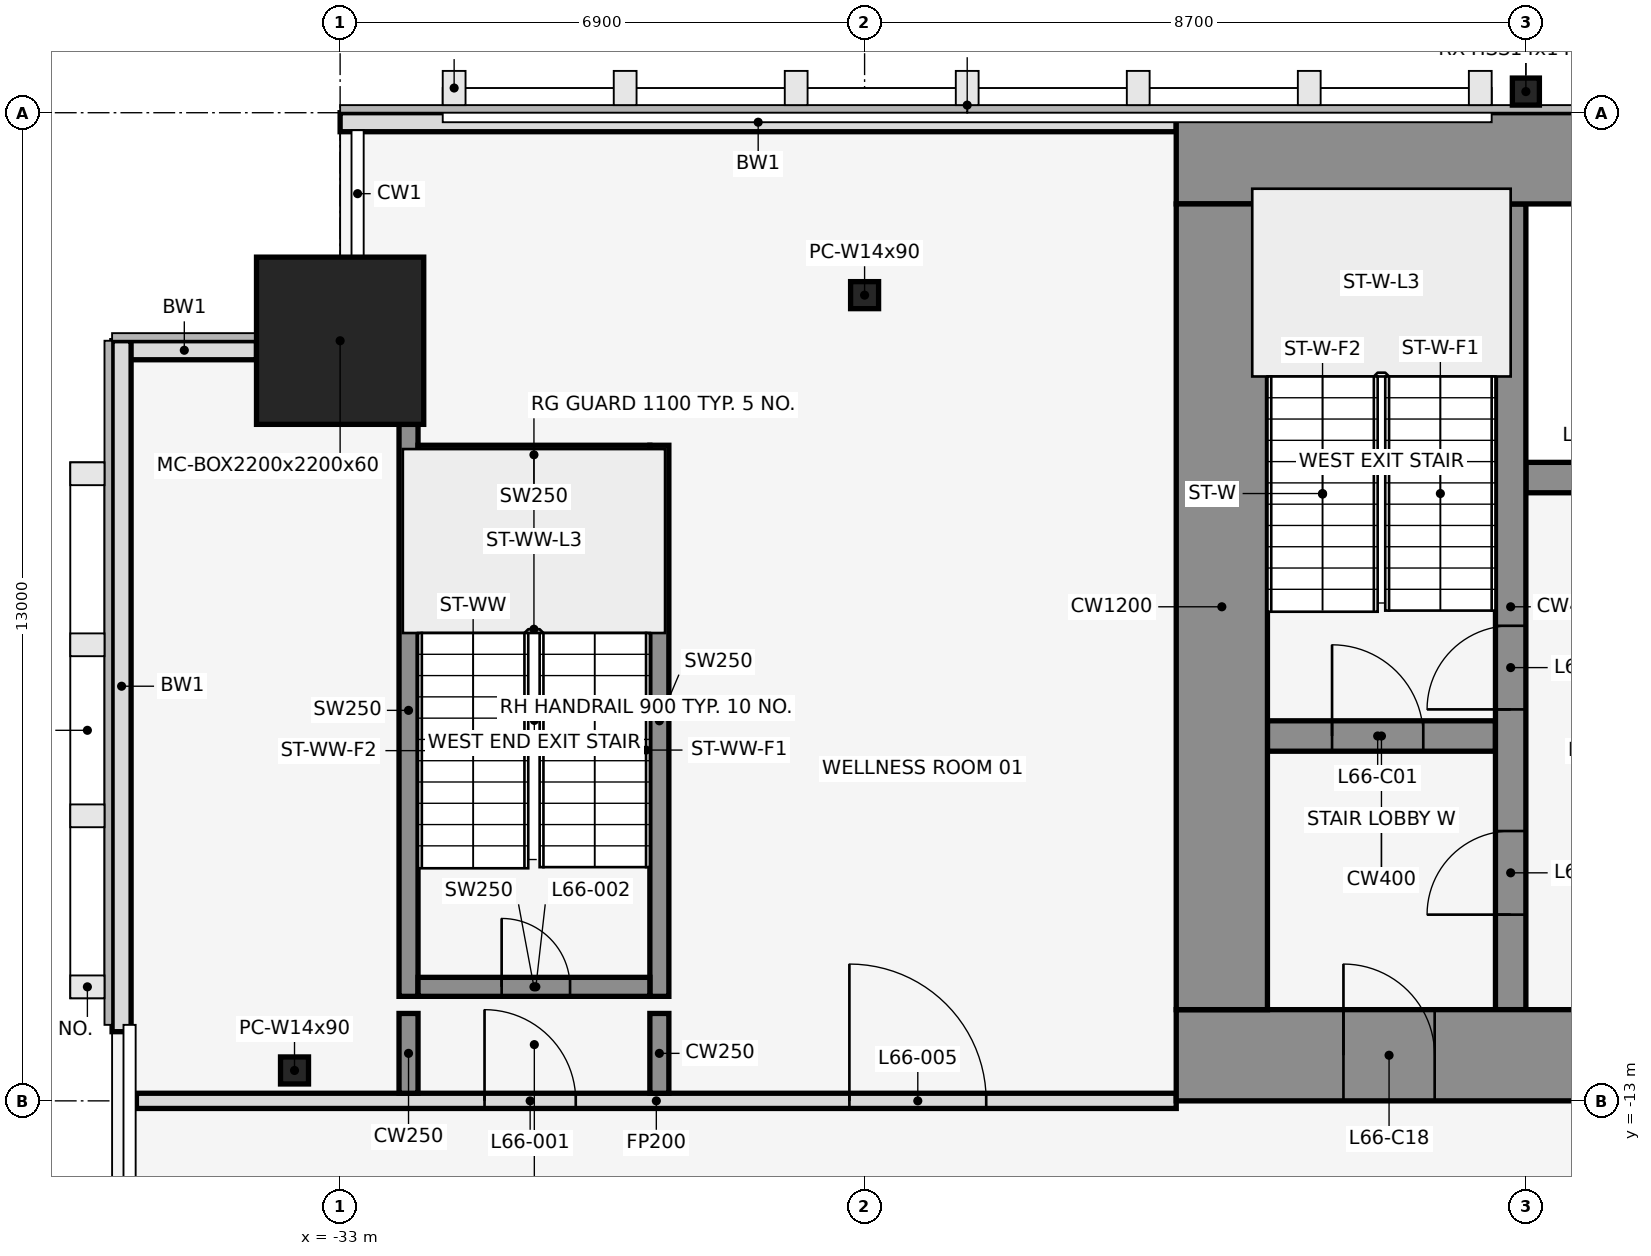
"""IFC4 building model, lengths in metres.
Left out: names, types, materials, properties, quantities, classifications, styles, units other than length and angle.
Written with IfcOpenShell. Run it as: python <this file> out.ifc"""

import sys

from ifc_helpers import new_model, si_unit, direction, frame, frame_2d, origin, origin_2d, place, context, subcontext, project, spatial, rectangle, hollow_rectangle, i_section, extrude, element, fill, save


model = new_model("IFC4")
c1 = context("Model", 3, precision=1e-05, world=origin(), true_north=direction((0.0, 1.0)))
c2 = subcontext(c1, "Body", "Model", "MODEL_VIEW")
j1 = project(units=[si_unit("LENGTHUNIT", "METRE"), si_unit("PLANEANGLEUNIT", "RADIAN")], contexts=[c1])
p1 = place(None, origin())
s1 = spatial("IfcSite", under=j1, at=p1, CompositionType="ELEMENT")
p2 = place(p1, origin())
s2 = spatial("IfcBuilding", under=s1, at=p2, CompositionType="ELEMENT")
p3 = place(p2, frame((0.0, 0.0, 293.0)))
s3 = spatial("IfcBuildingStorey", under=s2, at=p3, CompositionType="ELEMENT", Elevation=293.0)
p4 = place(p3, frame((-33.0, -3.0, 0.0), z_axis=(0.0, 0.0, 1.0), x_axis=(1.0, 0.0, 0.0)))
e1 = element("IfcColumn", 1, at=p4, inside=s3, PredefinedType="COLUMN", context=c2, shape_type="SweptSolid", body=[
    extrude(hollow_rectangle(XDim=2.2, YDim=2.2, WallThickness=0.06, at=origin_2d()), origin(), (0.0, 0.0, 1.0), 4.5),
])
p5 = place(p3, frame((-26.1, -2.4, 0.0), z_axis=(0.0, 0.0, 1.0), x_axis=(1.0, 0.0, 0.0)))
e2 = element("IfcColumn", 2, at=p5, inside=s3, PredefinedType="COLUMN", context=c2, shape_type="SweptSolid", body=[
    extrude(i_section(OverallWidth=0.368, OverallDepth=0.356, WebThickness=0.011, FlangeThickness=0.018, at=origin_2d()), origin(), (0.0, 0.0, 1.0), 4.5),
])
p6 = place(p3, frame((-17.4, 0.278, 0.0), z_axis=(0.0, 0.0, 1.0), x_axis=(1.0, 0.0, 0.0)))
e3 = element("IfcColumn", 3, at=p6, inside=s3, PredefinedType="COLUMN", context=c2, shape_type="SweptSolid", body=[
    extrude(hollow_rectangle(XDim=0.356, YDim=0.356, WallThickness=0.012, at=origin_2d()), origin(), (0.0, 0.0, 1.0), 4.5),
])
p7 = place(p3, frame((-33.6, -12.6, 0.0), z_axis=(0.0, 0.0, 1.0), x_axis=(1.0, 0.0, 0.0)))
e4 = element("IfcColumn", 4, at=p7, inside=s3, PredefinedType="COLUMN", context=c2, shape_type="SweptSolid", body=[
    extrude(i_section(OverallWidth=0.368, OverallDepth=0.356, WebThickness=0.011, FlangeThickness=0.018, at=origin_2d()), origin(), (0.0, 0.0, 1.0), 4.5),
])
p8 = place(p3, frame((-22.0, -0.125, 0.0), z_axis=(0.0, 0.0, 1.0), x_axis=(-1.0, 0.0, 0.0)))
e5 = element("IfcWall", 5, at=p8, inside=s3, PredefinedType="STANDARD", context=c2, shape_type="SweptSolid", body=[
    extrude(rectangle(XDim=11.0, YDim=0.25, at=frame_2d((5.5, 0.0))), origin(), (0.0, 0.0, 1.0), 4.35),
])
p9 = place(p3, frame((-34.1, -3.125, 0.0), z_axis=(0.0, 0.0, 1.0), x_axis=(-1.0, 0.0, 0.0)))
e6 = element("IfcWall", 6, at=p9, inside=s3, PredefinedType="STANDARD", context=c2, shape_type="SweptSolid", body=[
    extrude(rectangle(XDim=1.9, YDim=0.25, at=frame_2d((0.95, 0.0))), origin(), (0.0, 0.0, 1.0), 4.35),
])
p10 = place(p3, frame((-35.875, -3.0, 0.0), z_axis=(0.0, 0.0, 1.0), x_axis=(0.0, -1.0, 0.0)))
e7 = element("IfcWall", 7, at=p10, inside=s3, PredefinedType="STANDARD", context=c2, shape_type="SweptSolid", body=[
    extrude(rectangle(XDim=9.09, YDim=0.25, at=frame_2d((4.545, 0.0))), origin(), (0.0, 0.0, 1.0), 4.35),
])
p11 = place(p3, frame((-32.1, -11.625, 0.0), z_axis=(0.0, 0.0, 1.0), x_axis=(0.0, 1.0, 0.0)))
e8 = element("IfcWall", 8, at=p11, inside=s3, PredefinedType="SHEAR", context=c2, shape_type="SweptSolid", body=[
    extrude(rectangle(XDim=7.525, YDim=0.25, at=frame_2d((3.762, 0.0))), origin(), (0.0, 0.0, 1.0), 4.5),
])
p12 = place(p3, frame((-28.8, -11.625, 0.0), z_axis=(0.0, 0.0, 1.0), x_axis=(0.0, 1.0, 0.0)))
e9 = element("IfcWall", 9, at=p12, inside=s3, PredefinedType="SHEAR", context=c2, shape_type="SweptSolid", body=[
    extrude(rectangle(XDim=7.25, YDim=0.25, at=frame_2d((3.625, 0.0))), origin(), (0.0, 0.0, 1.0), 4.5),
])
p13 = place(p3, frame((-31.975, -11.5, 0.0), z_axis=(0.0, 0.0, 1.0), x_axis=(1.0, 0.0, 0.0)))
e10 = element("IfcWall", 10, at=p13, inside=s3, PredefinedType="SHEAR", context=c2, shape_type="SweptSolid", body=[
    extrude(rectangle(XDim=3.05, YDim=0.25, at=frame_2d((1.525, 0.0))), origin(), (0.0, 0.0, 1.0), 4.5),
])
p14 = place(p13, frame((1.1, 0.0, 0.0)))
e11 = element("IfcOpeningElement", 11, at=p14, cuts=e10, PredefinedType="OPENING", context=c2, shape_type="SweptSolid", body=[
    extrude(rectangle(XDim=0.9, YDim=2.1, at=frame_2d((0.45, 1.05))), frame((0.0, 0.137, 0.0), z_axis=(0.0, -1.0, 0.0), x_axis=(1.0, 0.0, 0.0)), (0.0, 0.0, 1.0), 0.274),
])
p15 = place(p3, frame((-31.975, -4.5, 0.0), z_axis=(0.0, 0.0, 1.0), x_axis=(1.0, 0.0, 0.0)))
e12 = element("IfcWall", 12, at=p15, inside=s3, PredefinedType="SHEAR", context=c2, shape_type="SweptSolid", body=[
    extrude(rectangle(XDim=3.05, YDim=0.25, at=frame_2d((1.525, 0.0))), origin(), (0.0, 0.0, 1.0), 4.5),
])
p16 = place(p3, frame((-35.68, -13.0, 0.0), z_axis=(0.0, 0.0, 1.0), x_axis=(1.0, 0.0, 0.0)))
e13 = element("IfcWall", 13, at=p16, inside=s3, PredefinedType="PARTITIONING", context=c2, shape_type="SweptSolid", body=[
    extrude(rectangle(XDim=13.68, YDim=0.2, at=frame_2d((6.84, 0.0))), origin(), (0.0, 0.0, 1.0), 3.418),
])
p17 = place(p16, frame((4.58, 0.0, 0.0)))
e14 = element("IfcOpeningElement", 14, at=p17, cuts=e13, PredefinedType="OPENING", context=c2, shape_type="SweptSolid", body=[
    extrude(rectangle(XDim=1.2, YDim=2.1, at=frame_2d((0.6, 1.05))), frame((0.0, 0.112, 0.0), z_axis=(0.0, -1.0, 0.0), x_axis=(1.0, 0.0, 0.0)), (0.0, 0.0, 1.0), 0.224),
])
p18 = place(p16, frame((9.38, 0.0, 0.0)))
e15 = element("IfcOpeningElement", 15, at=p18, cuts=e13, PredefinedType="OPENING", context=c2, shape_type="SweptSolid", body=[
    extrude(rectangle(XDim=1.8, YDim=2.1, at=frame_2d((0.9, 1.05))), frame((0.0, 0.112, 0.0), z_axis=(0.0, -1.0, 0.0), x_axis=(1.0, 0.0, 0.0)), (0.0, 0.0, 1.0), 0.224),
])
for number, where, z_axis, x_axis in (
    (16, (-32.1, -12.9, 0.0), (0.0, 0.0, 1.0), (0.0, 1.0, 0.0)),
    (17, (-28.8, -12.9, 0.0), (0.0, 0.0, 1.0), (0.0, 1.0, 0.0)),
):
    element("IfcWall", number, at=place(p3, frame(where, z_axis=z_axis, x_axis=x_axis)), inside=s3, PredefinedType="SHEAR", context=c2, shape_type="SweptSolid", body=[
        extrude(rectangle(XDim=1.05, YDim=0.25, at=frame_2d((0.525, 0.0))), origin(), (0.0, 0.0, 1.0), 4.5),
    ])
p19 = place(p3, frame((-20.8, -8.2, 0.0), z_axis=(0.0, 0.0, 1.0), x_axis=(1.0, 0.0, 0.0)))
e18 = element("IfcWall", 18, at=p19, inside=s3, PredefinedType="SHEAR", context=c2, shape_type="SweptSolid", body=[
    extrude(rectangle(XDim=3.0, YDim=0.4, at=frame_2d((1.5, 0.0))), origin(), (0.0, 0.0, 1.0), 4.5),
])
p20 = place(p19, frame((0.85, 0.0, 0.0)))
e19 = element("IfcOpeningElement", 19, at=p20, cuts=e18, PredefinedType="OPENING", context=c2, shape_type="SweptSolid", body=[
    extrude(rectangle(XDim=1.2, YDim=2.1, at=frame_2d((0.6, 1.05))), frame((0.0, 0.212, 0.0), z_axis=(0.0, -1.0, 0.0), x_axis=(1.0, 0.0, 0.0)), (0.0, 0.0, 1.0), 0.424),
])
p21 = place(p3, frame((-17.4, -4.8, 0.0), z_axis=(0.0, 0.0, 1.0), x_axis=(1.0, 0.0, 0.0)))
e20 = element("IfcWall", 20, at=p21, inside=s3, PredefinedType="SHEAR", context=c2, shape_type="SweptSolid", body=[
    extrude(rectangle(XDim=13.6, YDim=0.4, at=frame_2d((6.8, 0.0))), origin(), (0.0, 0.0, 1.0), 4.5),
])
p22 = place(p21, frame((0.65, 0.0, 0.0)))
e21 = element("IfcOpeningElement", 21, at=p22, cuts=e20, PredefinedType="OPENING", context=c2, shape_type="SweptSolid", body=[
    extrude(rectangle(XDim=1.1, YDim=2.1, at=frame_2d((0.55, 1.05))), frame((0.0, 0.212, 0.0), z_axis=(0.0, -1.0, 0.0), x_axis=(1.0, 0.0, 0.0)), (0.0, 0.0, 1.0), 0.424),
])
p23 = place(p21, frame((2.95, 0.0, 0.0)))
e22 = element("IfcOpeningElement", 22, at=p23, cuts=e20, PredefinedType="OPENING", context=c2, shape_type="SweptSolid", body=[
    extrude(rectangle(XDim=1.1, YDim=2.1, at=frame_2d((0.55, 1.05))), frame((0.0, 0.212, 0.0), z_axis=(0.0, -1.0, 0.0), x_axis=(1.0, 0.0, 0.0)), (0.0, 0.0, 1.0), 0.424),
])
p24 = place(p21, frame((5.85, 0.0, 0.0)))
e23 = element("IfcOpeningElement", 23, at=p24, cuts=e20, PredefinedType="OPENING", context=c2, shape_type="SweptSolid", body=[
    extrude(rectangle(XDim=0.9, YDim=2.1, at=frame_2d((0.45, 1.05))), frame((0.0, 0.212, 0.0), z_axis=(0.0, -1.0, 0.0), x_axis=(1.0, 0.0, 0.0)), (0.0, 0.0, 1.0), 0.424),
])
p25 = place(p21, frame((10.25, 0.0, 0.0)))
e24 = element("IfcOpeningElement", 24, at=p25, cuts=e20, PredefinedType="OPENING", context=c2, shape_type="SweptSolid", body=[
    extrude(rectangle(XDim=0.9, YDim=2.1, at=frame_2d((0.45, 1.05))), frame((0.0, 0.212, 0.0), z_axis=(0.0, -1.0, 0.0), x_axis=(1.0, 0.0, 0.0)), (0.0, 0.0, 1.0), 0.424),
])
p26 = place(p3, frame((-17.6, -11.8, 0.0), z_axis=(0.0, 0.0, 1.0), x_axis=(0.0, 1.0, 0.0)))
e25 = element("IfcWall", 25, at=p26, inside=s3, PredefinedType="SHEAR", context=c2, shape_type="SweptSolid", body=[
    extrude(rectangle(XDim=10.6, YDim=0.4, at=frame_2d((5.3, 0.0))), origin(), (0.0, 0.0, 1.0), 4.5),
])
p27 = place(p26, frame((1.25, 0.0, 0.0)))
e26 = element("IfcOpeningElement", 26, at=p27, cuts=e25, PredefinedType="OPENING", context=c2, shape_type="SweptSolid", body=[
    extrude(rectangle(XDim=1.1, YDim=2.1, at=frame_2d((0.55, 1.05))), frame((0.0, 0.212, 0.0), z_axis=(0.0, -1.0, 0.0), x_axis=(1.0, 0.0, 0.0)), (0.0, 0.0, 1.0), 0.424),
])
p28 = place(p26, frame((3.95, 0.0, 0.0)))
e27 = element("IfcOpeningElement", 27, at=p28, cuts=e25, PredefinedType="OPENING", context=c2, shape_type="SweptSolid", body=[
    extrude(rectangle(XDim=1.1, YDim=2.1, at=frame_2d((0.55, 1.05))), frame((0.0, 0.212, 0.0), z_axis=(0.0, -1.0, 0.0), x_axis=(1.0, 0.0, 0.0)), (0.0, 0.0, 1.0), 0.424),
])
p29 = place(p3, frame((-22.0, -0.6, 0.0), z_axis=(0.0, 0.0, 1.0), x_axis=(1.0, 0.0, 0.0)))
e28 = element("IfcWall", 28, at=p29, inside=s3, PredefinedType="SHEAR", context=c2, shape_type="SweptSolid", body=[
    extrude(rectangle(XDim=44.0, YDim=1.2, at=frame_2d((22.0, 0.0))), origin(), (0.0, 0.0, 1.0), 4.5),
])
p30 = place(p29, frame((18.55, 0.0, 0.0)))
e29 = element("IfcOpeningElement", 29, at=p30, cuts=e28, PredefinedType="OPENING", context=c2, shape_type="SweptSolid", body=[
    extrude(rectangle(XDim=0.9, YDim=2.1, at=frame_2d((0.45, 1.05))), frame((0.0, 0.612, 0.0), z_axis=(0.0, -1.0, 0.0), x_axis=(1.0, 0.0, 0.0)), (0.0, 0.0, 1.0), 1.224),
])
p31 = place(p29, frame((24.55, 0.0, 0.0)))
e30 = element("IfcOpeningElement", 30, at=p31, cuts=e28, PredefinedType="OPENING", context=c2, shape_type="SweptSolid", body=[
    extrude(rectangle(XDim=0.9, YDim=2.1, at=frame_2d((0.45, 1.05))), frame((0.0, 0.612, 0.0), z_axis=(0.0, -1.0, 0.0), x_axis=(1.0, 0.0, 0.0)), (0.0, 0.0, 1.0), 1.224),
])
p32 = place(p3, frame((-22.0, -12.4, 0.0), z_axis=(0.0, 0.0, 1.0), x_axis=(1.0, 0.0, 0.0)))
e31 = element("IfcWall", 31, at=p32, inside=s3, PredefinedType="SHEAR", context=c2, shape_type="SweptSolid", body=[
    extrude(rectangle(XDim=44.0, YDim=1.2, at=frame_2d((22.0, 0.0))), origin(), (0.0, 0.0, 1.0), 4.5),
])
p33 = place(p32, frame((2.2, 0.0, 0.0)))
e32 = element("IfcOpeningElement", 32, at=p33, cuts=e31, PredefinedType="OPENING", context=c2, shape_type="SweptSolid", body=[
    extrude(rectangle(XDim=1.2, YDim=2.1, at=frame_2d((0.6, 1.05))), frame((0.0, 0.612, 0.0), z_axis=(0.0, -1.0, 0.0), x_axis=(1.0, 0.0, 0.0)), (0.0, 0.0, 1.0), 1.224),
])
p34 = place(p32, frame((21.4, 0.0, 0.0)))
e33 = element("IfcOpeningElement", 33, at=p34, cuts=e31, PredefinedType="OPENING", context=c2, shape_type="SweptSolid", body=[
    extrude(rectangle(XDim=1.2, YDim=2.1, at=frame_2d((0.6, 1.05))), frame((0.0, 0.612, 0.0), z_axis=(0.0, -1.0, 0.0), x_axis=(1.0, 0.0, 0.0)), (0.0, 0.0, 1.0), 1.224),
])
p35 = place(p32, frame((40.6, 0.0, 0.0)))
e34 = element("IfcOpeningElement", 34, at=p35, cuts=e31, PredefinedType="OPENING", context=c2, shape_type="SweptSolid", body=[
    extrude(rectangle(XDim=1.2, YDim=2.1, at=frame_2d((0.6, 1.05))), frame((0.0, 0.612, 0.0), z_axis=(0.0, -1.0, 0.0), x_axis=(1.0, 0.0, 0.0)), (0.0, 0.0, 1.0), 1.224),
])
p36 = place(p32, frame((16.0, 0.0, 0.0)))
e35 = element("IfcOpeningElement", 35, at=p36, cuts=e31, PredefinedType="OPENING", context=c2, shape_type="SweptSolid", body=[
    extrude(rectangle(XDim=1.8, YDim=2.1, at=frame_2d((0.9, 1.05))), frame((0.0, 0.612, 0.0), z_axis=(0.0, -1.0, 0.0), x_axis=(1.0, 0.0, 0.0)), (0.0, 0.0, 1.0), 1.224),
])
p37 = place(p32, frame((6.3, 0.0, 0.0)))
e36 = element("IfcOpeningElement", 36, at=p37, cuts=e31, PredefinedType="OPENING", context=c2, shape_type="SweptSolid", body=[
    extrude(rectangle(XDim=1.2, YDim=2.1, at=frame_2d((0.6, 1.05))), frame((0.0, 0.612, 0.0), z_axis=(0.0, -1.0, 0.0), x_axis=(1.0, 0.0, 0.0)), (0.0, 0.0, 1.0), 1.224),
])
p38 = place(p32, frame((26.2, 0.0, 0.0)))
e37 = element("IfcOpeningElement", 37, at=p38, cuts=e31, PredefinedType="OPENING", context=c2, shape_type="SweptSolid", body=[
    extrude(rectangle(XDim=1.8, YDim=2.1, at=frame_2d((0.9, 1.05))), frame((0.0, 0.612, 0.0), z_axis=(0.0, -1.0, 0.0), x_axis=(1.0, 0.0, 0.0)), (0.0, 0.0, 1.0), 1.224),
])
p39 = place(p32, frame((36.5, 0.0, 0.0)))
e38 = element("IfcOpeningElement", 38, at=p39, cuts=e31, PredefinedType="OPENING", context=c2, shape_type="SweptSolid", body=[
    extrude(rectangle(XDim=1.2, YDim=2.1, at=frame_2d((0.6, 1.05))), frame((0.0, 0.612, 0.0), z_axis=(0.0, -1.0, 0.0), x_axis=(1.0, 0.0, 0.0)), (0.0, 0.0, 1.0), 1.224),
])
p40 = place(p3, frame((-21.4, -11.8, 0.0), z_axis=(0.0, 0.0, 1.0), x_axis=(0.0, 1.0, 0.0)))
e39 = element("IfcWall", 39, at=p40, inside=s3, PredefinedType="SHEAR", context=c2, shape_type="SweptSolid", body=[
    extrude(rectangle(XDim=10.6, YDim=1.2, at=frame_2d((5.3, 0.0))), origin(), (0.0, 0.0, 1.0), 4.5),
])
p41 = place(p17, origin())
e40 = element("IfcDoor", 40, at=p41, inside=s3, OperationType="SINGLE_SWING_LEFT", PredefinedType="DOOR", context=c2, shape_type="SweptSolid", body=[
    extrude(rectangle(XDim=1.2, YDim=2.1, at=frame_2d((0.6, 1.05))), frame((0.0, 0.025, 0.0), z_axis=(0.0, -1.0, 0.0), x_axis=(1.0, 0.0, 0.0)), (0.0, 0.0, 1.0), 0.05),
])
fill(e14, e40)
p42 = place(p14, origin())
e41 = element("IfcDoor", 41, at=p42, inside=s3, OperationType="SINGLE_SWING_LEFT", PredefinedType="DOOR", context=c2, shape_type="SweptSolid", body=[
    extrude(rectangle(XDim=0.9, YDim=2.1, at=frame_2d((0.45, 1.05))), frame((0.0, 0.025, 0.0), z_axis=(0.0, -1.0, 0.0), x_axis=(1.0, 0.0, 0.0)), (0.0, 0.0, 1.0), 0.05),
])
fill(e11, e41)
p43 = place(p18, origin())
e42 = element("IfcDoor", 42, at=p43, inside=s3, OperationType="SINGLE_SWING_LEFT", PredefinedType="DOOR", context=c2, shape_type="SweptSolid", body=[
    extrude(rectangle(XDim=1.8, YDim=2.1, at=frame_2d((0.9, 1.05))), frame((0.0, 0.025, 0.0), z_axis=(0.0, -1.0, 0.0), x_axis=(1.0, 0.0, 0.0)), (0.0, 0.0, 1.0), 0.05),
])
fill(e15, e42)
p44 = place(p20, origin())
e43 = element("IfcDoor", 43, at=p44, inside=s3, OperationType="SINGLE_SWING_LEFT", PredefinedType="DOOR", context=c2, shape_type="SweptSolid", body=[
    extrude(rectangle(XDim=1.2, YDim=2.1, at=frame_2d((0.6, 1.05))), frame((0.0, 0.025, 0.0), z_axis=(0.0, -1.0, 0.0), x_axis=(1.0, 0.0, 0.0)), (0.0, 0.0, 1.0), 0.05),
])
fill(e19, e43)
p45 = place(p27, frame((1.1, 0.0, 0.0), z_axis=(0.0, 0.0, 1.0), x_axis=(-1.0, 0.0, 0.0)))
e44 = element("IfcDoor", 44, at=p45, inside=s3, OperationType="SINGLE_SWING_LEFT", PredefinedType="DOOR", context=c2, shape_type="SweptSolid", body=[
    extrude(rectangle(XDim=1.1, YDim=2.1, at=frame_2d((0.55, 1.05))), frame((0.0, 0.025, 0.0), z_axis=(0.0, -1.0, 0.0), x_axis=(1.0, 0.0, 0.0)), (0.0, 0.0, 1.0), 0.05),
])
fill(e26, e44)
p46 = place(p28, frame((1.1, 0.0, 0.0), z_axis=(0.0, 0.0, 1.0), x_axis=(-1.0, 0.0, 0.0)))
e45 = element("IfcDoor", 45, at=p46, inside=s3, OperationType="SINGLE_SWING_LEFT", PredefinedType="DOOR", context=c2, shape_type="SweptSolid", body=[
    extrude(rectangle(XDim=1.1, YDim=2.1, at=frame_2d((0.55, 1.05))), frame((0.0, 0.025, 0.0), z_axis=(0.0, -1.0, 0.0), x_axis=(1.0, 0.0, 0.0)), (0.0, 0.0, 1.0), 0.05),
])
fill(e27, e45)
p47 = place(p33, frame((1.2, 0.0, 0.0), z_axis=(0.0, 0.0, 1.0), x_axis=(-1.0, 0.0, 0.0)))
e46 = element("IfcDoor", 46, at=p47, inside=s3, OperationType="SINGLE_SWING_RIGHT", PredefinedType="DOOR", context=c2, shape_type="SweptSolid", body=[
    extrude(rectangle(XDim=1.2, YDim=2.1, at=frame_2d((0.6, 1.05))), frame((0.0, 0.025, 0.0), z_axis=(0.0, -1.0, 0.0), x_axis=(1.0, 0.0, 0.0)), (0.0, 0.0, 1.0), 0.05),
])
fill(e32, e46)
save(model, sys.argv[1])
